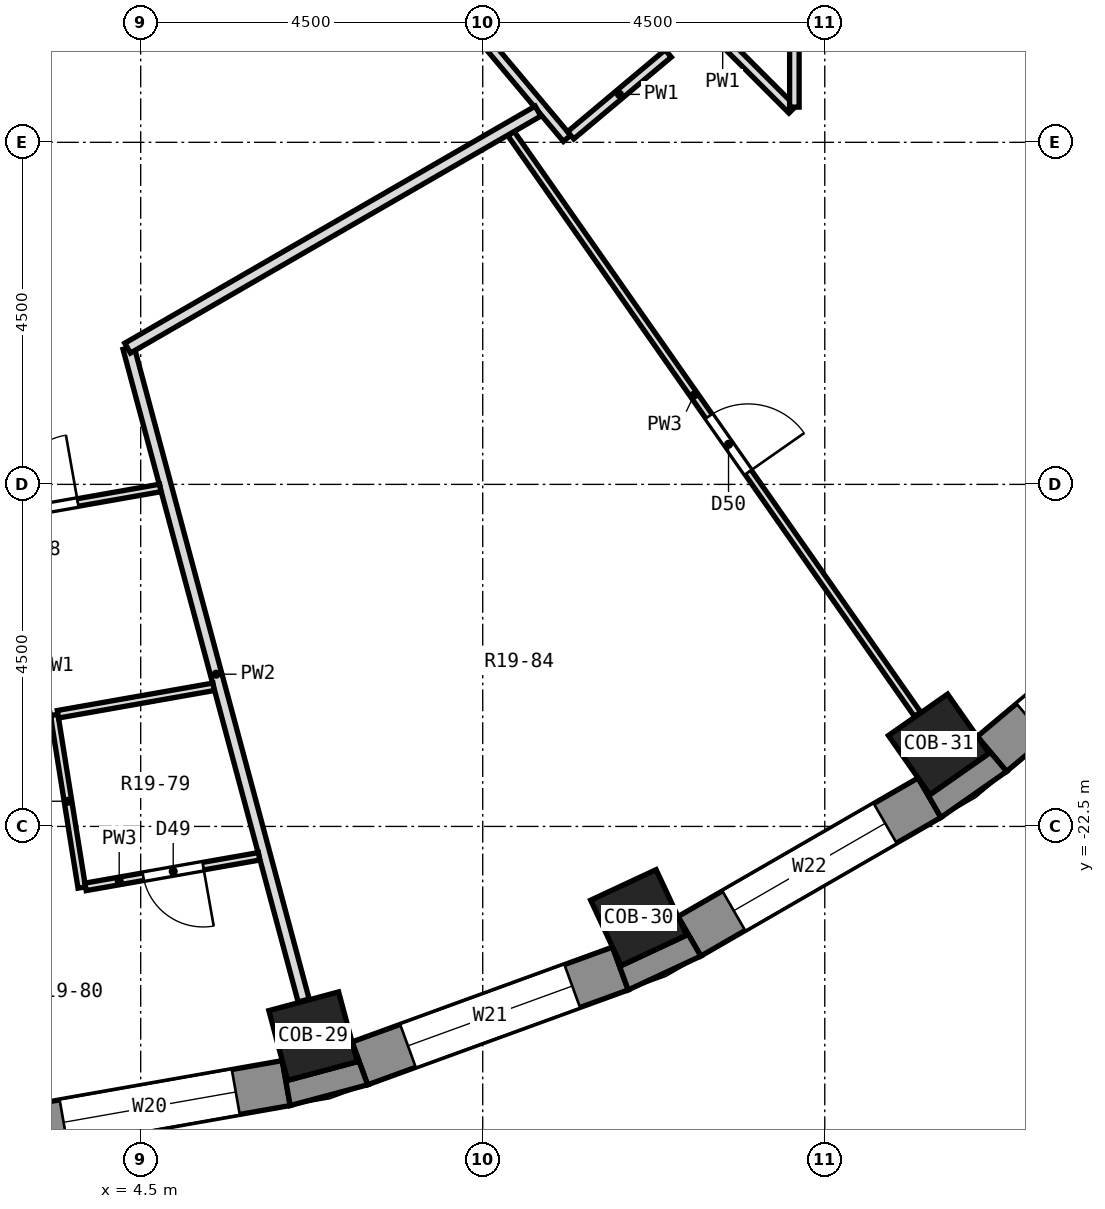
"""IFC4 building model, lengths in metres.
Left out: names, types, materials, properties, quantities, classifications, styles, units other than length and angle.
Written with IfcOpenShell. Run it as: python <this file> out.ifc"""

import sys

from ifc_helpers import new_model, si_unit, direction, frame, frame_2d, origin, origin_2d, place, context, subcontext, project, spatial, polyline, rectangle, outline, extrude, element, fill, save


model = new_model("IFC4")
c1 = context("Model", 3, precision=1e-05, world=origin(), true_north=direction((0.0, 1.0)))
c2 = subcontext(c1, "Body", "Model", "MODEL_VIEW")
j1 = project(units=[si_unit("LENGTHUNIT", "METRE"), si_unit("PLANEANGLEUNIT", "RADIAN")], contexts=[c1])
p1 = place(None, origin())
s1 = spatial("IfcSite", under=j1, at=p1, CompositionType="ELEMENT")
p2 = place(p1, origin())
s2 = spatial("IfcBuilding", under=s1, at=p2, CompositionType="ELEMENT")
p3 = place(p2, frame((0.0, 0.0, 111.7)))
s3 = spatial("IfcBuildingStorey", under=s2, at=p3, CompositionType="ELEMENT", Elevation=111.7)
for number, where, z_axis, x_axis in (
    (1, (6.768, -25.259, 0.0), (0.0, 0.0, 1.0), (0.259, -0.966, 0.0)),
    (2, (11.052, -23.7, 0.0), (0.0, 0.0, 1.0), (0.423, -0.906, 0.0)),
    (3, (14.999, -21.421, 0.0), (0.0, 0.0, 1.0), (0.574, -0.819, 0.0)),
):
    element("IfcColumn", number, at=place(p3, frame(where, z_axis=z_axis, x_axis=x_axis)), inside=s3, PredefinedType="COLUMN", context=c2, shape_type="SweptSolid", body=[
        extrude(rectangle(XDim=0.95, YDim=0.95, at=origin_2d()), origin(), (0.0, 0.0, 1.0), 3.3),
    ])
p4 = place(p3, frame((2.822, -26.51, 0.0), z_axis=(0.0, 0.0, 1.0), x_axis=(0.984803764455, 0.173670796382, 0.0)))
e4 = element("IfcWall", 4, at=p4, inside=s3, PredefinedType="SOLIDWALL", context=c2, shape_type="SweptSolid", body=[
    extrude(rectangle(XDim=3.648, YDim=0.6, at=frame_2d((1.824, 0.0))), origin(), (0.0, 0.0, 1.0), 2.8),
])
p5 = place(p4, frame((0.674, 0.0, 0.9)))
e5 = element("IfcOpeningElement", 5, at=p5, cuts=e4, PredefinedType="OPENING", context=c2, shape_type="SweptSolid", body=[
    extrude(rectangle(XDim=2.3, YDim=1.8, at=frame_2d((1.15, 0.9))), frame((0.0, 0.312, 0.0), z_axis=(0.0, -1.0, 0.0), x_axis=(1.0, 0.0, 0.0)), (0.0, 0.0, 1.0), 0.624),
])
p6 = place(p3, frame((7.383, -25.617, 0.0), z_axis=(0.0, 0.0, 1.0), x_axis=(0.939703505393, 0.341990236633, 0.0)))
e6 = element("IfcWall", 6, at=p6, inside=s3, PredefinedType="SOLIDWALL", context=c2, shape_type="SweptSolid", body=[
    extrude(rectangle(XDim=3.648, YDim=0.6, at=frame_2d((1.824, 0.0))), origin(), (0.0, 0.0, 1.0), 2.8),
])
p7 = place(p6, frame((0.674, 0.0, 0.9)))
e7 = element("IfcOpeningElement", 7, at=p7, cuts=e6, PredefinedType="OPENING", context=c2, shape_type="SweptSolid", body=[
    extrude(rectangle(XDim=2.3, YDim=1.8, at=frame_2d((1.15, 0.9))), frame((0.0, 0.312, 0.0), z_axis=(0.0, -1.0, 0.0), x_axis=(1.0, 0.0, 0.0)), (0.0, 0.0, 1.0), 0.624),
])
p8 = place(p3, frame((11.719, -23.946, 0.0), z_axis=(0.0, 0.0, 1.0), x_axis=(0.866051847062, 0.499954196102, 0.0)))
e8 = element("IfcWall", 8, at=p8, inside=s3, PredefinedType="SOLIDWALL", context=c2, shape_type="SweptSolid", body=[
    extrude(rectangle(XDim=3.648, YDim=0.6, at=frame_2d((1.824, 0.0))), origin(), (0.0, 0.0, 1.0), 2.8),
])
p9 = place(p8, frame((0.674, 0.0, 0.9)))
e9 = element("IfcOpeningElement", 9, at=p9, cuts=e8, PredefinedType="OPENING", context=c2, shape_type="SweptSolid", body=[
    extrude(rectangle(XDim=2.3, YDim=1.8, at=frame_2d((1.15, 0.9))), frame((0.0, 0.312, 0.0), z_axis=(0.0, -1.0, 0.0), x_axis=(1.0, 0.0, 0.0)), (0.0, 0.0, 1.0), 0.624),
])
p10 = place(p3, frame((15.699, -21.547, 0.0), z_axis=(0.0, 0.0, 1.0), x_axis=(0.766055462616, 0.642774476932, 0.0)))
e10 = element("IfcWall", 10, at=p10, inside=s3, PredefinedType="SOLIDWALL", context=c2, shape_type="SweptSolid", body=[
    extrude(rectangle(XDim=3.648, YDim=0.6, at=frame_2d((1.824, 0.0))), origin(), (0.0, 0.0, 1.0), 2.8),
])
p11 = place(p10, frame((0.674, 0.0, 0.9)))
e11 = element("IfcOpeningElement", 11, at=p11, cuts=e10, PredefinedType="OPENING", context=c2, shape_type="SweptSolid", body=[
    extrude(rectangle(XDim=2.3, YDim=1.8, at=frame_2d((1.15, 0.9))), frame((0.0, 0.312, 0.0), z_axis=(0.0, -1.0, 0.0), x_axis=(1.0, 0.0, 0.0)), (0.0, 0.0, 1.0), 0.624),
])
p12 = place(p3, origin())
e12 = element("IfcWall", 12, at=p12, inside=s3, PredefinedType="SOLIDWALL", context=c2, shape_type="SweptSolid", body=[
    extrude(outline(polyline([(6.467, -26.172), (7.486, -25.899), (7.28, -25.335), (7.35, -25.595), (6.432, -25.841), (6.363, -25.581), (6.467, -26.172)])), origin(), (0.0, 0.0, 1.0), 2.8),
])
p13 = place(p3, origin())
e13 = element("IfcWall", 13, at=p13, inside=s3, PredefinedType="SOLIDWALL", context=c2, shape_type="SweptSolid", body=[
    extrude(outline(polyline([(10.913, -24.651), (11.869, -24.206), (11.569, -23.686), (11.683, -23.93), (10.822, -24.331), (10.708, -24.087), (10.913, -24.651)])), origin(), (0.0, 0.0, 1.0), 2.8),
])
p14 = place(p3, origin())
e14 = element("IfcWall", 14, at=p14, inside=s3, PredefinedType="SOLIDWALL", context=c2, shape_type="SweptSolid", body=[
    extrude(outline(polyline([(15.892, -21.777), (15.506, -21.317), (15.661, -21.538), (14.882, -22.083), (14.728, -21.862), (15.028, -22.382), (15.892, -21.777)])), origin(), (0.0, 0.0, 1.0), 2.8),
])
p15 = place(p3, frame((3.362, -21.033, 0.0), z_axis=(0.0, 0.0, 1.0), x_axis=(0.157853871444, -0.987462482968, 0.0)))
e15 = element("IfcWall", 15, at=p15, inside=s3, PredefinedType="PARTITIONING", context=c2, shape_type="SweptSolid", body=[
    extrude(rectangle(XDim=2.3, YDim=0.1, at=frame_2d((1.15, 0.0))), origin(), (0.0, 0.0, 1.0), 2.8),
])
p16 = place(p3, frame((4.34, -16.204, 0.0), z_axis=(0.0, 0.0, 1.0), x_axis=(0.259146062247, -0.965838142973, 0.0)))
e16 = element("IfcWall", 16, at=p16, inside=s3, PredefinedType="PARTITIONING", context=c2, shape_type="SweptSolid", body=[
    extrude(rectangle(XDim=8.89, YDim=0.15, at=frame_2d((4.445, 0.0))), origin(), (0.0, 0.0, 1.0), 2.8),
])
p17 = place(p3, frame((9.371, -13.385, 0.0), z_axis=(0.0, 0.0, 1.0), x_axis=(0.573555460551, -0.819166731302, 0.0)))
e17 = element("IfcWall", 17, at=p17, inside=s3, PredefinedType="PARTITIONING", context=c2, shape_type="SweptSolid", body=[
    extrude(rectangle(XDim=9.326, YDim=0.1, at=frame_2d((4.663, 0.0))), origin(), (0.0, 0.0, 1.0), 2.8),
])
p18 = place(p17, frame((4.541, 0.0, 0.0)))
e18 = element("IfcOpeningElement", 18, at=p18, cuts=e17, PredefinedType="OPENING", context=c2, shape_type="SweptSolid", body=[
    extrude(rectangle(XDim=0.9, YDim=2.1, at=frame_2d((0.45, 1.05))), frame((0.0, 0.062, 0.0), z_axis=(0.0, -1.0, 0.0), x_axis=(1.0, 0.0, 0.0)), (0.0, 0.0, 1.0), 0.124),
])
p19 = place(p3, frame((6.253, -8.852, 0.0), z_axis=(0.0, 0.0, 1.0), x_axis=(0.642738639283, -0.766085531499, 0.0)))
e19 = element("IfcWall", 19, at=p19, inside=s3, PredefinedType="PARTITIONING", context=c2, shape_type="SweptSolid", body=[
    extrude(rectangle(XDim=5.999, YDim=0.125, at=frame_2d((3.0, 0.0))), origin(), (0.0, 0.0, 1.0), 2.8),
])
p20 = place(p19, frame((2.244, 0.0, 0.0)))
e20 = element("IfcOpeningElement", 20, at=p20, cuts=e19, PredefinedType="OPENING", context=c2, shape_type="SweptSolid", body=[
    extrude(rectangle(XDim=1.0, YDim=2.1, at=frame_2d((0.5, 1.05))), frame((0.0, 0.074, 0.0), z_axis=(0.0, -1.0, 0.0), x_axis=(1.0, 0.0, 0.0)), (0.0, 0.0, 1.0), 0.149),
])
p21 = place(p3, frame((11.241, -11.239, 0.0), z_axis=(0.0, 0.0, 1.0), x_axis=(0.707106781187, -0.707106781187, 0.0)))
e21 = element("IfcWall", 21, at=p21, inside=s3, PredefinedType="PARTITIONING", context=c2, shape_type="SweptSolid", body=[
    extrude(rectangle(XDim=2.591, YDim=0.125, at=frame_2d((1.295, 0.0))), origin(), (0.0, 0.0, 1.0), 2.8),
])
p22 = place(p3, frame((3.774, -23.295, 0.0), z_axis=(0.0, 0.0, 1.0), x_axis=(0.984822762683, 0.173563032072, 0.0)))
e22 = element("IfcWall", 22, at=p22, inside=s3, PredefinedType="PARTITIONING", context=c2, shape_type="SweptSolid", body=[
    extrude(rectangle(XDim=2.318, YDim=0.1, at=frame_2d((1.159, 0.0))), origin(), (0.0, 0.0, 1.0), 2.8),
])
p23 = place(p22, frame((0.771, 0.0, 0.0)))
e23 = element("IfcOpeningElement", 23, at=p23, cuts=e22, PredefinedType="OPENING", context=c2, shape_type="SweptSolid", body=[
    extrude(rectangle(XDim=0.8, YDim=2.1, at=frame_2d((0.4, 1.05))), frame((0.0, 0.062, 0.0), z_axis=(0.0, -1.0, 0.0), x_axis=(1.0, 0.0, 0.0)), (0.0, 0.0, 1.0), 0.124),
])
p24 = place(p3, frame((3.411, -21.024, 0.0), z_axis=(0.0, 0.0, 1.0), x_axis=(0.984791830212, 0.173738456158, 0.0)))
e24 = element("IfcWall", 24, at=p24, inside=s3, PredefinedType="PARTITIONING", context=c2, shape_type="SweptSolid", body=[
    extrude(rectangle(XDim=2.08, YDim=0.1, at=frame_2d((1.04, 0.0))), origin(), (0.0, 0.0, 1.0), 2.8),
])
p25 = place(p3, frame((1.676, -18.59, 0.0), z_axis=(0.0, 0.0, 1.0), x_axis=(0.984818097546, 0.173589500677, 0.0)))
e25 = element("IfcWall", 25, at=p25, inside=s3, PredefinedType="PARTITIONING", context=c2, shape_type="SweptSolid", body=[
    extrude(rectangle(XDim=3.129, YDim=0.1, at=frame_2d((1.565, 0.0))), origin(), (0.0, 0.0, 1.0), 2.8),
])
p26 = place(p25, frame((1.127, 0.0, 0.0)))
e26 = element("IfcOpeningElement", 26, at=p26, cuts=e25, PredefinedType="OPENING", context=c2, shape_type="SweptSolid", body=[
    extrude(rectangle(XDim=0.9, YDim=2.1, at=frame_2d((0.45, 1.05))), frame((0.0, 0.062, 0.0), z_axis=(0.0, -1.0, 0.0), x_axis=(1.0, 0.0, 0.0)), (0.0, 0.0, 1.0), 0.124),
])
p27 = place(p3, frame((4.328, -16.208, 0.0), z_axis=(0.0, 0.0, 1.0), x_axis=(0.865952126022, 0.500126899334, 0.0)))
e27 = element("IfcWall", 27, at=p27, inside=s3, PredefinedType="PARTITIONING", context=c2, shape_type="SweptSolid", body=[
    extrude(rectangle(XDim=6.235, YDim=0.15, at=frame_2d((3.118, 0.0))), origin(), (0.0, 0.0, 1.0), 2.8),
])
p28 = place(p3, frame((10.157, -13.408, 0.0), z_axis=(0.0, 0.0, 1.0), x_axis=(0.766066523004, 0.642761294986, 0.0)))
e28 = element("IfcWall", 28, at=p28, inside=s3, PredefinedType="PARTITIONING", context=c2, shape_type="SweptSolid", body=[
    extrude(rectangle(XDim=1.675, YDim=0.125, at=frame_2d((0.837, 0.0))), origin(), (0.0, 0.0, 1.0), 2.8),
])
p29 = place(p3, frame((13.1, -13.037, 0.0), z_axis=(0.0, 0.0, 1.0), x_axis=(0.0, 1.0, 0.0)))
e29 = element("IfcWall", 29, at=p29, inside=s3, PredefinedType="PARTITIONING", context=c2, shape_type="SweptSolid", body=[
    extrude(rectangle(XDim=3.277, YDim=0.125, at=frame_2d((1.638, 0.0))), origin(), (0.0, 0.0, 1.0), 2.8),
])
p30 = place(p29, frame((1.282, 0.0, 0.0)))
e30 = element("IfcOpeningElement", 30, at=p30, cuts=e29, PredefinedType="OPENING", context=c2, shape_type="SweptSolid", body=[
    extrude(rectangle(XDim=0.9, YDim=2.1, at=frame_2d((0.45, 1.05))), frame((0.0, 0.074, 0.0), z_axis=(0.0, -1.0, 0.0), x_axis=(1.0, 0.0, 0.0)), (0.0, 0.0, 1.0), 0.149),
])
p31 = place(p5, origin())
e31 = element("IfcWindow", 31, at=p31, inside=s3, PartitioningType="SINGLE_PANEL", PredefinedType="WINDOW", context=c2, shape_type="SweptSolid", body=[
    extrude(rectangle(XDim=2.3, YDim=1.8, at=frame_2d((1.15, 0.9))), frame((0.0, 0.18, 0.0), z_axis=(0.0, -1.0, 0.0), x_axis=(1.0, 0.0, 0.0)), (0.0, 0.0, 1.0), 0.06),
])
fill(e5, e31)
p32 = place(p7, origin())
e32 = element("IfcWindow", 32, at=p32, inside=s3, PartitioningType="SINGLE_PANEL", PredefinedType="WINDOW", context=c2, shape_type="SweptSolid", body=[
    extrude(rectangle(XDim=2.3, YDim=1.8, at=frame_2d((1.15, 0.9))), frame((0.0, 0.18, 0.0), z_axis=(0.0, -1.0, 0.0), x_axis=(1.0, 0.0, 0.0)), (0.0, 0.0, 1.0), 0.06),
])
fill(e7, e32)
p33 = place(p9, origin())
e33 = element("IfcWindow", 33, at=p33, inside=s3, PartitioningType="SINGLE_PANEL", PredefinedType="WINDOW", context=c2, shape_type="SweptSolid", body=[
    extrude(rectangle(XDim=2.3, YDim=1.8, at=frame_2d((1.15, 0.9))), frame((0.0, 0.18, 0.0), z_axis=(0.0, -1.0, 0.0), x_axis=(1.0, 0.0, 0.0)), (0.0, 0.0, 1.0), 0.06),
])
fill(e9, e33)
p34 = place(p11, origin())
e34 = element("IfcWindow", 34, at=p34, inside=s3, PartitioningType="SINGLE_PANEL", PredefinedType="WINDOW", context=c2, shape_type="SweptSolid", body=[
    extrude(rectangle(XDim=2.3, YDim=1.8, at=frame_2d((1.15, 0.9))), frame((0.0, 0.18, 0.0), z_axis=(0.0, -1.0, 0.0), x_axis=(1.0, 0.0, 0.0)), (0.0, 0.0, 1.0), 0.06),
])
fill(e11, e34)
p35 = place(p26, origin())
e35 = element("IfcDoor", 35, at=p35, inside=s3, OperationType="SINGLE_SWING_RIGHT", PredefinedType="DOOR", context=c2, shape_type="SweptSolid", body=[
    extrude(rectangle(XDim=0.9, YDim=2.1, at=frame_2d((0.45, 1.05))), frame((0.0, 0.025, 0.0), z_axis=(0.0, -1.0, 0.0), x_axis=(1.0, 0.0, 0.0)), (0.0, 0.0, 1.0), 0.05),
])
fill(e26, e35)
p36 = place(p23, frame((0.8, 0.0, 0.0), z_axis=(0.0, 0.0, 1.0), x_axis=(-1.0, 0.0, 0.0)))
e36 = element("IfcDoor", 36, at=p36, inside=s3, OperationType="SINGLE_SWING_LEFT", PredefinedType="DOOR", context=c2, shape_type="SweptSolid", body=[
    extrude(rectangle(XDim=0.8, YDim=2.1, at=frame_2d((0.4, 1.05))), frame((0.0, 0.025, 0.0), z_axis=(0.0, -1.0, 0.0), x_axis=(1.0, 0.0, 0.0)), (0.0, 0.0, 1.0), 0.05),
])
fill(e23, e36)
p37 = place(p18, origin())
e37 = element("IfcDoor", 37, at=p37, inside=s3, OperationType="SINGLE_SWING_RIGHT", PredefinedType="DOOR", context=c2, shape_type="SweptSolid", body=[
    extrude(rectangle(XDim=0.9, YDim=2.1, at=frame_2d((0.45, 1.05))), frame((0.0, 0.025, 0.0), z_axis=(0.0, -1.0, 0.0), x_axis=(1.0, 0.0, 0.0)), (0.0, 0.0, 1.0), 0.05),
])
fill(e18, e37)
save(model, sys.argv[1])
